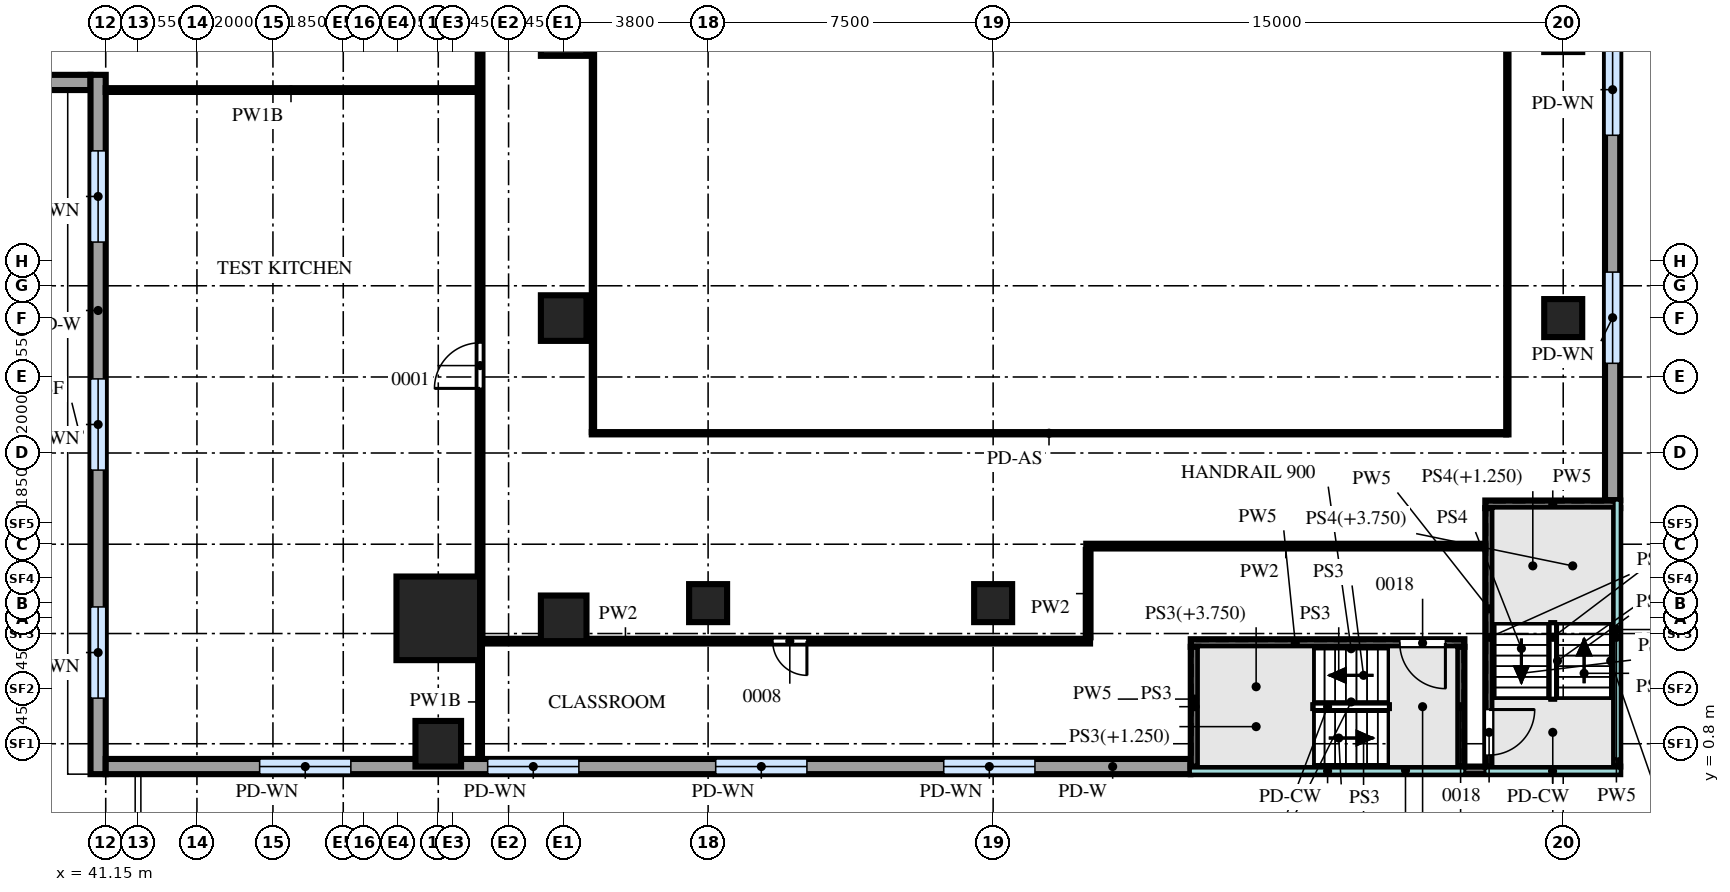
"""IFC4 building model, lengths in metres.
Left out: names, types, materials, properties, quantities, classifications, styles, units other than length and angle.
Written with IfcOpenShell. Run it as: python <this file> out.ifc"""

import sys

from ifc_helpers import new_model, si_unit, direction, frame, frame_2d, origin, origin_2d, place, context, subcontext, project, spatial, rectangle, extrude, source, transform, mapped, element, fill, save


model = new_model("IFC4")
c1 = context("Model", 3, precision=1e-05, world=origin(), true_north=direction((0.0, 1.0)))
c2 = subcontext(c1, "Body", "Model", "MODEL_VIEW")
j1 = project(units=[si_unit("LENGTHUNIT", "METRE"), si_unit("PLANEANGLEUNIT", "RADIAN")], contexts=[c1])
p1 = place(None, origin())
s1 = spatial("IfcSite", under=j1, at=p1, CompositionType="ELEMENT")
p2 = place(p1, origin())
s2 = spatial("IfcBuilding", under=s1, at=p2, CompositionType="ELEMENT")
p3 = place(p2, frame((0.0, 0.0, 23.5)))
s3 = spatial("IfcBuildingStorey", under=s2, at=p3, CompositionType="ELEMENT", Elevation=23.5)
m1 = source(origin(), c2, "Body", "SweptSolid", [
    extrude(rectangle(XDim=2.2, YDim=2.2, at=origin_2d()), origin(), (0.0, 0.0, 1.0), 4.7),
])
p4 = place(p3, frame((49.9, 4.1, 0.0), z_axis=(0.0, 0.0, 1.0), x_axis=(1.0, 0.0, 0.0)))
e1 = element("IfcColumn", 1, at=p4, inside=s3, PredefinedType="COLUMN", context=c2, shape_type="MappedRepresentation", body=[
    mapped(m1, transform((0.0, 0.0, 0.0))),
])
m2 = source(origin(), c2, "Body", "SweptSolid", [
    extrude(rectangle(XDim=1.2, YDim=1.2, at=origin_2d()), origin(), (0.0, 0.0, 1.0), 4.7),
])
for number, where, z_axis, x_axis in (
    (2, (49.9, 0.8, 0.0), (0.0, 0.0, 1.0), (1.0, 0.0, 0.0)),
    (3, (53.2, 4.1, 0.0), (0.0, 0.0, 1.0), (1.0, 0.0, 0.0)),
    (4, (53.2, 12.0, 0.0), (0.0, 0.0, 1.0), (1.0, 0.0, 0.0)),
    (5, (53.2, 19.5, 0.0), (0.0, 0.0, 1.0), (1.0, 0.0, 0.0)),
):
    element("IfcColumn", number, at=place(p3, frame(where, z_axis=z_axis, x_axis=x_axis)), inside=s3, PredefinedType="COLUMN", context=c2, shape_type="MappedRepresentation", body=[
        mapped(m2, transform((0.0, 0.0, 0.0))),
    ])
m3 = source(origin(), c2, "Body", "SweptSolid", [
    extrude(rectangle(XDim=1.0, YDim=1.0, at=origin_2d()), origin(), (0.0, 0.0, 1.0), 4.7),
])
for number, where, z_axis, x_axis in (
    (6, (57.0, 4.5, 0.0), (0.0, 0.0, 1.0), (1.0, 0.0, 0.0)),
    (7, (64.5, 4.5, 0.0), (0.0, 0.0, 1.0), (1.0, 0.0, 0.0)),
    (8, (79.5, 12.0, 0.0), (0.0, 0.0, 1.0), (1.0, 0.0, 0.0)),
):
    element("IfcColumn", number, at=place(p3, frame(where, z_axis=z_axis, x_axis=x_axis)), inside=s3, PredefinedType="COLUMN", context=c2, shape_type="MappedRepresentation", body=[
        mapped(m3, transform((0.0, 0.0, 0.0))),
    ])
m4 = source(origin(), c2, "Body", "SweptSolid", [
    extrude(rectangle(XDim=9.9, YDim=0.4, at=frame_2d((4.95, 0.0))), origin(), (0.0, 0.0, 1.0), 4.7),
])
p5 = place(p3, frame((30.85, 18.2, 0.0), z_axis=(0.0, 0.0, 1.0), x_axis=(1.0, 0.0, 0.0)))
e9 = element("IfcWall", 9, at=p5, inside=s3, PredefinedType="SOLIDWALL", context=c2, shape_type="MappedRepresentation", body=[
    mapped(m4, transform((0.0, 0.0, 0.0))),
])
m5 = source(origin(), c2, "Body", "SweptSolid", [
    extrude(rectangle(XDim=2.4, YDim=2.4, at=frame_2d((1.2, 1.2))), frame((0.0, 0.21, 0.0), z_axis=(0.0, -1.0, 0.0), x_axis=(1.0, 0.0, 0.0)), (0.0, 0.0, 1.0), 0.42),
])
p6 = place(p5, frame((3.75, 0.0, 1.0)))
e10 = element("IfcOpeningElement", 10, at=p6, cuts=e9, PredefinedType="OPENING", context=c2, shape_type="MappedRepresentation", body=[
    mapped(m5, transform((0.0, 0.0, 0.0))),
])
m6 = source(origin(), c2, "Body", "SweptSolid", [
    extrude(rectangle(XDim=18.4, YDim=0.4, at=frame_2d((9.2, 0.0))), origin(), (0.0, 0.0, 1.0), 4.7),
])
p7 = place(p3, frame((40.95, 18.4, 0.0), z_axis=(0.0, 0.0, 1.0), x_axis=(0.0, -1.0, 0.0)))
e11 = element("IfcWall", 11, at=p7, inside=s3, PredefinedType="SOLIDWALL", context=c2, shape_type="MappedRepresentation", body=[
    mapped(m6, transform((0.0, 0.0, 0.0))),
])
p8 = place(p7, frame((2.0, 0.0, 1.0)))
e12 = element("IfcOpeningElement", 12, at=p8, cuts=e11, PredefinedType="OPENING", context=c2, shape_type="MappedRepresentation", body=[
    mapped(m5, transform((0.0, 0.0, 0.0))),
])
p9 = place(p7, frame((8.0, 0.0, 1.0)))
e13 = element("IfcOpeningElement", 13, at=p9, cuts=e11, PredefinedType="OPENING", context=c2, shape_type="MappedRepresentation", body=[
    mapped(m5, transform((0.0, 0.0, 0.0))),
])
p10 = place(p7, frame((14.0, 0.0, 1.0)))
e14 = element("IfcOpeningElement", 14, at=p10, cuts=e11, PredefinedType="OPENING", context=c2, shape_type="MappedRepresentation", body=[
    mapped(m5, transform((0.0, 0.0, 0.0))),
])
m7 = source(origin(), c2, "Body", "SweptSolid", [
    extrude(rectangle(XDim=28.54, YDim=0.4, at=frame_2d((14.27, 0.0))), origin(), (0.0, 0.0, 1.0), 4.7),
])
p11 = place(p3, frame((41.15, 0.2, 0.0), z_axis=(0.0, 0.0, 1.0), x_axis=(1.0, 0.0, 0.0)))
e15 = element("IfcWall", 15, at=p11, inside=s3, PredefinedType="SOLIDWALL", context=c2, shape_type="MappedRepresentation", body=[
    mapped(m7, transform((0.0, 0.0, 0.0))),
])
p12 = place(p11, frame((4.05, 0.0, 1.0)))
e16 = element("IfcOpeningElement", 16, at=p12, cuts=e15, PredefinedType="OPENING", context=c2, shape_type="MappedRepresentation", body=[
    mapped(m5, transform((0.0, 0.0, 0.0))),
])
p13 = place(p11, frame((10.05, 0.0, 1.0)))
e17 = element("IfcOpeningElement", 17, at=p13, cuts=e15, PredefinedType="OPENING", context=c2, shape_type="MappedRepresentation", body=[
    mapped(m5, transform((0.0, 0.0, 0.0))),
])
p14 = place(p11, frame((16.05, 0.0, 1.0)))
e18 = element("IfcOpeningElement", 18, at=p14, cuts=e15, PredefinedType="OPENING", context=c2, shape_type="MappedRepresentation", body=[
    mapped(m5, transform((0.0, 0.0, 0.0))),
])
p15 = place(p11, frame((22.05, 0.0, 1.0)))
e19 = element("IfcOpeningElement", 19, at=p15, cuts=e15, PredefinedType="OPENING", context=c2, shape_type="MappedRepresentation", body=[
    mapped(m5, transform((0.0, 0.0, 0.0))),
])
m8 = source(origin(), c2, "Body", "SweptSolid", [
    extrude(rectangle(XDim=39.58, YDim=0.4, at=frame_2d((19.79, 0.0))), origin(), (0.0, 0.0, 1.0), 4.7),
])
p16 = place(p3, frame((80.8, 7.21, 0.0), z_axis=(0.0, 0.0, 1.0), x_axis=(0.0, 1.0, 0.0)))
e20 = element("IfcWall", 20, at=p16, inside=s3, PredefinedType="SOLIDWALL", context=c2, shape_type="MappedRepresentation", body=[
    mapped(m8, transform((0.0, 0.0, 0.0))),
])
p17 = place(p16, frame((3.6, 0.0, 1.0)))
e21 = element("IfcOpeningElement", 21, at=p17, cuts=e20, PredefinedType="OPENING", context=c2, shape_type="MappedRepresentation", body=[
    mapped(m5, transform((0.0, 0.0, 0.0))),
])
p18 = place(p16, frame((9.6, 0.0, 1.0)))
e22 = element("IfcOpeningElement", 22, at=p18, cuts=e20, PredefinedType="OPENING", context=c2, shape_type="MappedRepresentation", body=[
    mapped(m5, transform((0.0, 0.0, 0.0))),
])
p19 = place(p16, frame((15.6, 0.0, 1.0)))
e23 = element("IfcOpeningElement", 23, at=p19, cuts=e20, PredefinedType="OPENING", context=c2, shape_type="MappedRepresentation", body=[
    mapped(m5, transform((0.0, 0.0, 0.0))),
])
p20 = place(p16, frame((21.6, 0.0, 1.0)))
e24 = element("IfcOpeningElement", 24, at=p20, cuts=e20, PredefinedType="OPENING", context=c2, shape_type="MappedRepresentation", body=[
    mapped(m5, transform((0.0, 0.0, 0.0))),
])
p21 = place(p16, frame((27.6, 0.0, 1.0)))
e25 = element("IfcOpeningElement", 25, at=p21, cuts=e20, PredefinedType="OPENING", context=c2, shape_type="MappedRepresentation", body=[
    mapped(m5, transform((0.0, 0.0, 0.0))),
])
p22 = place(p16, frame((33.6, 0.0, 1.0)))
e26 = element("IfcOpeningElement", 26, at=p22, cuts=e20, PredefinedType="OPENING", context=c2, shape_type="MappedRepresentation", body=[
    mapped(m5, transform((0.0, 0.0, 0.0))),
])
m9 = source(origin(), c2, "Body", "SweptSolid", [
    extrude(rectangle(XDim=36.06, YDim=0.06, at=frame_2d((18.03, 0.0))), origin(), (0.0, 0.0, 1.0), 4.7),
])
for number, where, z_axis, x_axis in (
    (27, (78.03, 8.94, 0.0), (0.0, 0.0, 1.0), (0.0, 1.0, 0.0)),
    (28, (53.97, 45.06, 0.0), (0.0, 0.0, 1.0), (0.0, -1.0, 0.0)),
):
    element("IfcWall", number, at=place(p3, frame(where, z_axis=z_axis, x_axis=x_axis)), inside=s3, PredefinedType="SOLIDWALL", context=c2, shape_type="MappedRepresentation", body=[
        mapped(m9, transform((0.0, 0.0, 0.0))),
    ])
m10 = source(origin(), c2, "Body", "SweptSolid", [
    extrude(rectangle(XDim=24.06, YDim=0.06, at=frame_2d((12.03, 0.0))), origin(), (0.0, 0.0, 1.0), 4.7),
])
p23 = place(p3, frame((53.94, 8.97, 0.0), z_axis=(0.0, 0.0, 1.0), x_axis=(1.0, 0.0, 0.0)))
e29 = element("IfcWall", 29, at=p23, inside=s3, PredefinedType="SOLIDWALL", context=c2, shape_type="MappedRepresentation", body=[
    mapped(m10, transform((0.0, 0.0, 0.0))),
])
m11 = source(origin(), c2, "Body", "SweptSolid", [
    extrude(rectangle(XDim=11.3, YDim=0.2, at=frame_2d((5.65, 0.0))), origin(), (0.0, 0.0, 1.0), 4.7),
])
p24 = place(p3, frame((69.7, 0.1, 0.0), z_axis=(0.0, 0.0, 1.0), x_axis=(1.0, 0.0, 0.0)))
e30 = element("IfcWall", 30, at=p24, inside=s3, PredefinedType="PARTITIONING", context=c2, shape_type="MappedRepresentation", body=[
    mapped(m11, transform((0.0, 0.0, 0.0))),
])
m12 = source(origin(), c2, "Body", "SweptSolid", [
    extrude(rectangle(XDim=7.2, YDim=0.2, at=frame_2d((3.6, 0.0))), origin(), (0.0, 0.0, 1.0), 4.7),
])
p25 = place(p3, frame((69.7, 3.45, 0.0), z_axis=(0.0, 0.0, 1.0), x_axis=(1.0, 0.0, 0.0)))
e31 = element("IfcWall", 31, at=p25, inside=s3, PredefinedType="PARTITIONING", context=c2, shape_type="MappedRepresentation", body=[
    mapped(m12, transform((0.0, 0.0, 0.0))),
])
m13 = source(origin(), c2, "Body", "SweptSolid", [
    extrude(rectangle(XDim=1.2, YDim=2.1, at=frame_2d((0.6, 1.05))), frame((0.0, 0.11, 0.0), z_axis=(0.0, -1.0, 0.0), x_axis=(1.0, 0.0, 0.0)), (0.0, 0.0, 1.0), 0.22),
])
p26 = place(p25, frame((5.5, 0.0, 0.0)))
e32 = element("IfcOpeningElement", 32, at=p26, cuts=e31, PredefinedType="OPENING", context=c2, shape_type="MappedRepresentation", body=[
    mapped(m13, transform((0.0, 0.0, 0.0))),
])
m14 = source(origin(), c2, "Body", "SweptSolid", [
    extrude(rectangle(XDim=3.15, YDim=0.2, at=frame_2d((1.575, 0.0))), origin(), (0.0, 0.0, 1.0), 4.7),
])
for number, where, z_axis, x_axis in (
    (33, (69.8, 0.2, 0.0), (0.0, 0.0, 1.0), (0.0, 1.0, 0.0)),
    (34, (76.8, 0.2, 0.0), (0.0, 0.0, 1.0), (0.0, 1.0, 0.0)),
):
    element("IfcWall", number, at=place(p3, frame(where, z_axis=z_axis, x_axis=x_axis)), inside=s3, PredefinedType="PARTITIONING", context=c2, shape_type="MappedRepresentation", body=[
        mapped(m14, transform((0.0, 0.0, 0.0))),
    ])
m15 = source(origin(), c2, "Body", "SweptSolid", [
    extrude(rectangle(XDim=3.55, YDim=0.2, at=frame_2d((1.775, 0.0))), origin(), (0.0, 0.0, 1.0), 4.7),
])
p27 = place(p3, frame((77.45, 7.1, 0.0), z_axis=(0.0, 0.0, 1.0), x_axis=(1.0, 0.0, 0.0)))
e35 = element("IfcWall", 35, at=p27, inside=s3, PredefinedType="PARTITIONING", context=c2, shape_type="MappedRepresentation", body=[
    mapped(m15, transform((0.0, 0.0, 0.0))),
])
m16 = source(origin(), c2, "Body", "SweptSolid", [
    extrude(rectangle(XDim=6.8, YDim=0.2, at=frame_2d((3.4, 0.0))), origin(), (0.0, 0.0, 1.0), 4.7),
])
p28 = place(p3, frame((77.55, 0.2, 0.0), z_axis=(0.0, 0.0, 1.0), x_axis=(0.0, 1.0, 0.0)))
e36 = element("IfcWall", 36, at=p28, inside=s3, PredefinedType="PARTITIONING", context=c2, shape_type="MappedRepresentation", body=[
    mapped(m16, transform((0.0, 0.0, 0.0))),
])
p29 = place(p28, frame((0.3, 0.0, 0.0)))
e37 = element("IfcOpeningElement", 37, at=p29, cuts=e36, PredefinedType="OPENING", context=c2, shape_type="MappedRepresentation", body=[
    mapped(m13, transform((0.0, 0.0, 0.0))),
])
p30 = place(p3, frame((80.9, 0.2, 0.0), z_axis=(0.0, 0.0, 1.0), x_axis=(0.0, 1.0, 0.0)))
e38 = element("IfcWall", 38, at=p30, inside=s3, PredefinedType="PARTITIONING", context=c2, shape_type="MappedRepresentation", body=[
    mapped(m16, transform((0.0, 0.0, 0.0))),
])
m17 = source(origin(), c2, "Body", "SweptSolid", [
    extrude(rectangle(XDim=3.0, YDim=0.1, at=frame_2d((1.5, 0.0))), origin(), (0.0, 0.0, 1.0), 4.7),
])
p31 = place(p3, frame((51.0, 0.4, 0.0), z_axis=(0.0, 0.0, 1.0), x_axis=(0.0, 1.0, 0.0)))
e39 = element("IfcWall", 39, at=p31, inside=s3, PredefinedType="PARTITIONING", context=c2, shape_type="MappedRepresentation", body=[
    mapped(m17, transform((0.0, 0.0, 0.0))),
])
m18 = source(origin(), c2, "Body", "SweptSolid", [
    extrude(rectangle(XDim=16.1, YDim=0.125, at=frame_2d((8.05, 0.0))), origin(), (0.0, 0.0, 1.0), 4.7),
])
p32 = place(p3, frame((50.95, 3.5, 0.0), z_axis=(0.0, 0.0, 1.0), x_axis=(1.0, 0.0, 0.0)))
e40 = element("IfcWall", 40, at=p32, inside=s3, PredefinedType="PARTITIONING", context=c2, shape_type="MappedRepresentation", body=[
    mapped(m18, transform((0.0, 0.0, 0.0))),
])
m19 = source(origin(), c2, "Body", "SweptSolid", [
    extrude(rectangle(XDim=0.9, YDim=2.1, at=frame_2d((0.45, 1.05))), frame((0.0, 0.073, 0.0), z_axis=(0.0, -1.0, 0.0), x_axis=(1.0, 0.0, 0.0)), (0.0, 0.0, 1.0), 0.145),
])
p33 = place(p32, frame((7.75, 0.0, 0.0)))
e41 = element("IfcOpeningElement", 41, at=p33, cuts=e40, PredefinedType="OPENING", context=c2, shape_type="MappedRepresentation", body=[
    mapped(m19, transform((0.0, 0.0, 0.0))),
])
m20 = source(origin(), c2, "Body", "SweptSolid", [
    extrude(rectangle(XDim=29.7, YDim=0.125, at=frame_2d((14.85, 0.0))), origin(), (0.0, 0.0, 1.0), 4.7),
])
p34 = place(p3, frame((51.0, 3.6, 0.0), z_axis=(0.0, 0.0, 1.0), x_axis=(0.0, 1.0, 0.0)))
e42 = element("IfcWall", 42, at=p34, inside=s3, PredefinedType="PARTITIONING", context=c2, shape_type="MappedRepresentation", body=[
    mapped(m20, transform((0.0, 0.0, 0.0))),
])
m21 = source(origin(), c2, "Body", "SweptSolid", [
    extrude(rectangle(XDim=1.2, YDim=2.1, at=frame_2d((0.6, 1.05))), frame((0.0, 0.073, 0.0), z_axis=(0.0, -1.0, 0.0), x_axis=(1.0, 0.0, 0.0)), (0.0, 0.0, 1.0), 0.145),
])
p35 = place(p34, frame((6.55, 0.0, 0.0)))
e43 = element("IfcOpeningElement", 43, at=p35, cuts=e42, PredefinedType="OPENING", context=c2, shape_type="MappedRepresentation", body=[
    mapped(m21, transform((0.0, 0.0, 0.0))),
])
m22 = source(origin(), c2, "Body", "SweptSolid", [
    extrude(rectangle(XDim=2.3, YDim=0.125, at=frame_2d((1.15, 0.0))), origin(), (0.0, 0.0, 1.0), 4.7),
])
p36 = place(p3, frame((67.0, 3.6, 0.0), z_axis=(0.0, 0.0, 1.0), x_axis=(0.0, 1.0, 0.0)))
e44 = element("IfcWall", 44, at=p36, inside=s3, PredefinedType="PARTITIONING", context=c2, shape_type="MappedRepresentation", body=[
    mapped(m22, transform((0.0, 0.0, 0.0))),
])
m23 = source(origin(), c2, "Body", "SweptSolid", [
    extrude(rectangle(XDim=10.5, YDim=0.125, at=frame_2d((5.25, 0.0))), origin(), (0.0, 0.0, 1.0), 4.7),
])
p37 = place(p3, frame((66.95, 6.0, 0.0), z_axis=(0.0, 0.0, 1.0), x_axis=(1.0, 0.0, 0.0)))
e45 = element("IfcWall", 45, at=p37, inside=s3, PredefinedType="PARTITIONING", context=c2, shape_type="MappedRepresentation", body=[
    mapped(m23, transform((0.0, 0.0, 0.0))),
])
m24 = source(origin(), c2, "Body", "SweptSolid", [
    extrude(rectangle(XDim=9.75, YDim=0.1, at=frame_2d((4.875, 0.0))), origin(), (0.0, 0.0, 1.0), 4.7),
])
p38 = place(p3, frame((41.15, 18.0, 0.0), z_axis=(0.0, 0.0, 1.0), x_axis=(1.0, 0.0, 0.0)))
e46 = element("IfcWall", 46, at=p38, inside=s3, PredefinedType="PARTITIONING", context=c2, shape_type="MappedRepresentation", body=[
    mapped(m24, transform((0.0, 0.0, 0.0))),
])
m25 = source(origin(), c2, "Body", "SweptSolid", [
    extrude(rectangle(XDim=2.4, YDim=2.4, at=frame_2d((1.2, 1.2))), frame((0.0, 0.03, 0.0), z_axis=(0.0, -1.0, 0.0), x_axis=(1.0, 0.0, 0.0)), (0.0, 0.0, 1.0), 0.06),
])
p39 = place(p8, origin())
e47 = element("IfcWindow", 47, at=p39, inside=s3, PartitioningType="SINGLE_PANEL", PredefinedType="WINDOW", context=c2, shape_type="MappedRepresentation", body=[
    mapped(m25, transform((0.0, 0.0, 0.0))),
])
fill(e12, e47)
p40 = place(p9, origin())
e48 = element("IfcWindow", 48, at=p40, inside=s3, PartitioningType="SINGLE_PANEL", PredefinedType="WINDOW", context=c2, shape_type="MappedRepresentation", body=[
    mapped(m25, transform((0.0, 0.0, 0.0))),
])
fill(e13, e48)
p41 = place(p10, origin())
e49 = element("IfcWindow", 49, at=p41, inside=s3, PartitioningType="SINGLE_PANEL", PredefinedType="WINDOW", context=c2, shape_type="MappedRepresentation", body=[
    mapped(m25, transform((0.0, 0.0, 0.0))),
])
fill(e14, e49)
p42 = place(p12, origin())
e50 = element("IfcWindow", 50, at=p42, inside=s3, PartitioningType="SINGLE_PANEL", PredefinedType="WINDOW", context=c2, shape_type="MappedRepresentation", body=[
    mapped(m25, transform((0.0, 0.0, 0.0))),
])
fill(e16, e50)
p43 = place(p13, origin())
e51 = element("IfcWindow", 51, at=p43, inside=s3, PartitioningType="SINGLE_PANEL", PredefinedType="WINDOW", context=c2, shape_type="MappedRepresentation", body=[
    mapped(m25, transform((0.0, 0.0, 0.0))),
])
fill(e17, e51)
p44 = place(p14, origin())
e52 = element("IfcWindow", 52, at=p44, inside=s3, PartitioningType="SINGLE_PANEL", PredefinedType="WINDOW", context=c2, shape_type="MappedRepresentation", body=[
    mapped(m25, transform((0.0, 0.0, 0.0))),
])
fill(e18, e52)
p45 = place(p15, origin())
e53 = element("IfcWindow", 53, at=p45, inside=s3, PartitioningType="SINGLE_PANEL", PredefinedType="WINDOW", context=c2, shape_type="MappedRepresentation", body=[
    mapped(m25, transform((0.0, 0.0, 0.0))),
])
fill(e19, e53)
p46 = place(p17, origin())
e54 = element("IfcWindow", 54, at=p46, inside=s3, PartitioningType="SINGLE_PANEL", PredefinedType="WINDOW", context=c2, shape_type="MappedRepresentation", body=[
    mapped(m25, transform((0.0, 0.0, 0.0))),
])
fill(e21, e54)
p47 = place(p18, origin())
e55 = element("IfcWindow", 55, at=p47, inside=s3, PartitioningType="SINGLE_PANEL", PredefinedType="WINDOW", context=c2, shape_type="MappedRepresentation", body=[
    mapped(m25, transform((0.0, 0.0, 0.0))),
])
fill(e22, e55)
m26 = source(origin(), c2, "Body", "SweptSolid", [
    extrude(rectangle(XDim=1.2, YDim=2.1, at=frame_2d((0.6, 1.05))), frame((0.0, 0.025, 0.0), z_axis=(0.0, -1.0, 0.0), x_axis=(1.0, 0.0, 0.0)), (0.0, 0.0, 1.0), 0.05),
])
p48 = place(p35, origin())
e56 = element("IfcDoor", 56, at=p48, inside=s3, OperationType="SINGLE_SWING_RIGHT", PredefinedType="DOOR", context=c2, shape_type="MappedRepresentation", body=[
    mapped(m26, transform((0.0, 0.0, 0.0))),
])
fill(e43, e56)
m27 = source(origin(), c2, "Body", "SweptSolid", [
    extrude(rectangle(XDim=0.9, YDim=2.1, at=frame_2d((0.45, 1.05))), frame((0.0, 0.025, 0.0), z_axis=(0.0, -1.0, 0.0), x_axis=(1.0, 0.0, 0.0)), (0.0, 0.0, 1.0), 0.05),
])
p49 = place(p33, origin())
e57 = element("IfcDoor", 57, at=p49, inside=s3, OperationType="SINGLE_SWING_RIGHT", PredefinedType="DOOR", context=c2, shape_type="MappedRepresentation", body=[
    mapped(m27, transform((0.0, 0.0, 0.0))),
])
fill(e41, e57)
p50 = place(p26, origin())
e58 = element("IfcDoor", 58, at=p50, inside=s3, OperationType="SINGLE_SWING_RIGHT", PredefinedType="DOOR", context=c2, shape_type="MappedRepresentation", body=[
    mapped(m26, transform((0.0, 0.0, 0.0))),
])
fill(e32, e58)
p51 = place(p29, origin())
e59 = element("IfcDoor", 59, at=p51, inside=s3, OperationType="SINGLE_SWING_RIGHT", PredefinedType="DOOR", context=c2, shape_type="MappedRepresentation", body=[
    mapped(m26, transform((0.0, 0.0, 0.0))),
])
fill(e37, e59)
save(model, sys.argv[1])
